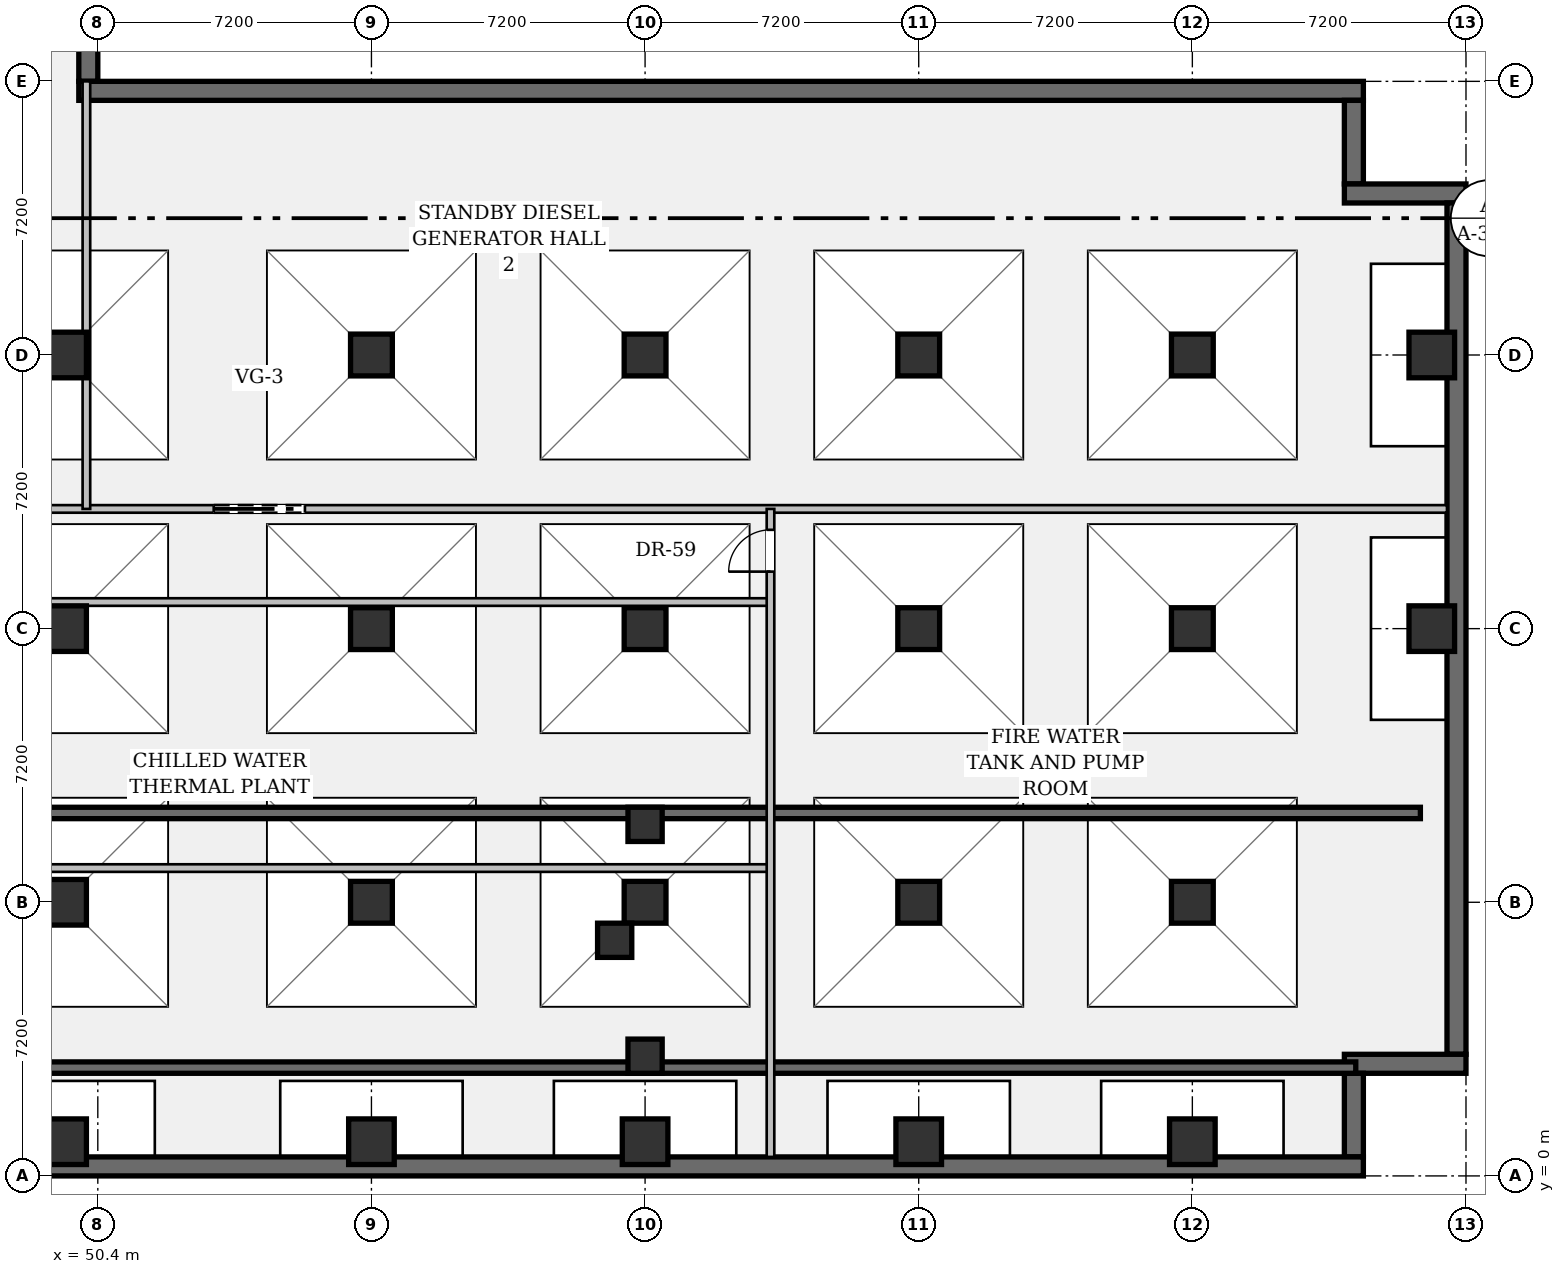
"""IFC4 building model, lengths in metres.
Left out: names, types, materials, properties, quantities, classifications, styles, units other than length and angle.
Written with IfcOpenShell. Run it as: python <this file> out.ifc"""

import sys

from ifc_helpers import new_model, si_unit, direction, frame, frame_2d, origin, origin_2d, place, context, subcontext, project, spatial, rectangle, hollow_rectangle, extrude, element, fill, save


model = new_model("IFC4")
c1 = context("Model", 3, precision=1e-05, world=origin(), true_north=direction((0.0, 1.0)))
c2 = subcontext(c1, "Body", "Model", "MODEL_VIEW")
j1 = project(units=[si_unit("LENGTHUNIT", "METRE"), si_unit("PLANEANGLEUNIT", "RADIAN")], contexts=[c1])
p1 = place(None, origin())
s1 = spatial("IfcSite", under=j1, at=p1, CompositionType="ELEMENT")
p2 = place(p1, origin())
s2 = spatial("IfcBuilding", under=s1, at=p2, CompositionType="ELEMENT")
p3 = place(p2, frame((0.0, 0.0, -9.1)))
s3 = spatial("IfcBuildingStorey", under=s2, at=p3, CompositionType="ELEMENT", Elevation=-9.1)
p4 = place(p3, frame((50.15, 47.2, 0.0), z_axis=(0.0, 0.0, 1.0), x_axis=(0.0, -1.0, 0.0)))
e1 = element("IfcWall", 1, at=p4, inside=s3, PredefinedType="SOLIDWALL", context=c2, shape_type="SweptSolid", body=[
    extrude(rectangle(XDim=18.4, YDim=0.5, at=frame_2d((9.2, 0.0))), origin(), (0.0, 0.0, 1.0), 4.25),
])
p5 = place(p3, frame((49.9, 28.55, 0.0), z_axis=(0.0, 0.0, 1.0), x_axis=(1.0, 0.0, 0.0)))
e2 = element("IfcWall", 2, at=p5, inside=s3, PredefinedType="SOLIDWALL", context=c2, shape_type="SweptSolid", body=[
    extrude(rectangle(XDim=33.8, YDim=0.5, at=frame_2d((16.9, 0.0))), origin(), (0.0, 0.0, 1.0), 4.25),
])
p6 = place(p3, frame((83.45, 28.3, 0.0), z_axis=(0.0, 0.0, 1.0), x_axis=(0.0, -1.0, 0.0)))
e3 = element("IfcWall", 3, at=p6, inside=s3, PredefinedType="SOLIDWALL", context=c2, shape_type="SweptSolid", body=[
    extrude(rectangle(XDim=2.2, YDim=0.5, at=frame_2d((1.1, 0.0))), origin(), (0.0, 0.0, 1.0), 4.25),
])
p7 = place(p3, frame((83.2, 25.85, 0.0), z_axis=(0.0, 0.0, 1.0), x_axis=(1.0, 0.0, 0.0)))
e4 = element("IfcWall", 4, at=p7, inside=s3, PredefinedType="SOLIDWALL", context=c2, shape_type="SweptSolid", body=[
    extrude(rectangle(XDim=3.2, YDim=0.5, at=frame_2d((1.6, 0.0))), origin(), (0.0, 0.0, 1.0), 4.25),
])
p8 = place(p3, frame((86.15, 25.6, 0.0), z_axis=(0.0, 0.0, 1.0), x_axis=(0.0, -1.0, 0.0)))
e5 = element("IfcWall", 5, at=p8, inside=s3, PredefinedType="SOLIDWALL", context=c2, shape_type="SweptSolid", body=[
    extrude(rectangle(XDim=22.4, YDim=0.5, at=frame_2d((11.2, 0.0))), origin(), (0.0, 0.0, 1.0), 4.25),
])
p9 = place(p3, frame((86.4, 2.95, 0.0), z_axis=(0.0, 0.0, 1.0), x_axis=(-1.0, 0.0, 0.0)))
e6 = element("IfcWall", 6, at=p9, inside=s3, PredefinedType="SOLIDWALL", context=c2, shape_type="SweptSolid", body=[
    extrude(rectangle(XDim=3.2, YDim=0.5, at=frame_2d((1.6, 0.0))), origin(), (0.0, 0.0, 1.0), 4.25),
])
p10 = place(p3, frame((83.45, 2.7, 0.0), z_axis=(0.0, 0.0, 1.0), x_axis=(0.0, -1.0, 0.0)))
e7 = element("IfcWall", 7, at=p10, inside=s3, PredefinedType="SOLIDWALL", context=c2, shape_type="SweptSolid", body=[
    extrude(rectangle(XDim=2.2, YDim=0.5, at=frame_2d((1.1, 0.0))), origin(), (0.0, 0.0, 1.0), 4.25),
])
p11 = place(p3, frame((83.7, 0.25, 0.0), z_axis=(0.0, 0.0, 1.0), x_axis=(-1.0, 0.0, 0.0)))
e8 = element("IfcWall", 8, at=p11, inside=s3, PredefinedType="SOLIDWALL", context=c2, shape_type="SweptSolid", body=[
    extrude(rectangle(XDim=81.0, YDim=0.5, at=frame_2d((40.5, 0.0))), origin(), (0.0, 0.0, 1.0), 4.25),
])
for number, where, z_axis, x_axis in (
    (9, (49.5, 0.9, 0.0), (0.0, 0.0, 1.0), (1.0, 0.0, 0.0)),
    (10, (49.5, 7.2, 0.0), (0.0, 0.0, 1.0), (1.0, 0.0, 0.0)),
    (11, (49.5, 14.4, 0.0), (0.0, 0.0, 1.0), (1.0, 0.0, 0.0)),
    (12, (49.5, 21.6, 0.0), (0.0, 0.0, 1.0), (1.0, 0.0, 0.0)),
    (13, (57.6, 0.9, 0.0), (0.0, 0.0, 1.0), (1.0, 0.0, 0.0)),
):
    element("IfcColumn", number, at=place(p3, frame(where, z_axis=z_axis, x_axis=x_axis)), inside=s3, PredefinedType="COLUMN", context=c2, shape_type="SweptSolid", body=[
        extrude(hollow_rectangle(XDim=1.2, YDim=1.2, WallThickness=0.075, at=origin_2d()), origin(), (0.0, 0.0, 1.0), 4.25),
    ])
for number, where, z_axis, x_axis in (
    (14, (57.6, 7.2, 0.0), (0.0, 0.0, 1.0), (1.0, 0.0, 0.0)),
    (15, (57.6, 14.4, 0.0), (0.0, 0.0, 1.0), (1.0, 0.0, 0.0)),
    (16, (57.6, 21.6, 0.0), (0.0, 0.0, 1.0), (1.0, 0.0, 0.0)),
):
    element("IfcColumn", number, at=place(p3, frame(where, z_axis=z_axis, x_axis=x_axis)), inside=s3, PredefinedType="COLUMN", context=c2, shape_type="SweptSolid", body=[
        extrude(rectangle(XDim=1.1, YDim=1.1, at=origin_2d()), origin(), (0.0, 0.0, 1.0), 4.25),
    ])
p12 = place(p3, frame((64.8, 0.9, 0.0), z_axis=(0.0, 0.0, 1.0), x_axis=(1.0, 0.0, 0.0)))
e17 = element("IfcColumn", 17, at=p12, inside=s3, PredefinedType="COLUMN", context=c2, shape_type="SweptSolid", body=[
    extrude(hollow_rectangle(XDim=1.2, YDim=1.2, WallThickness=0.075, at=origin_2d()), origin(), (0.0, 0.0, 1.0), 4.25),
])
for number, where, z_axis, x_axis in (
    (18, (64.8, 7.2, 0.0), (0.0, 0.0, 1.0), (1.0, 0.0, 0.0)),
    (19, (64.8, 14.4, 0.0), (0.0, 0.0, 1.0), (1.0, 0.0, 0.0)),
    (20, (64.8, 21.6, 0.0), (0.0, 0.0, 1.0), (1.0, 0.0, 0.0)),
):
    element("IfcColumn", number, at=place(p3, frame(where, z_axis=z_axis, x_axis=x_axis)), inside=s3, PredefinedType="COLUMN", context=c2, shape_type="SweptSolid", body=[
        extrude(rectangle(XDim=1.1, YDim=1.1, at=origin_2d()), origin(), (0.0, 0.0, 1.0), 4.25),
    ])
p13 = place(p3, frame((72.0, 0.9, 0.0), z_axis=(0.0, 0.0, 1.0), x_axis=(1.0, 0.0, 0.0)))
e21 = element("IfcColumn", 21, at=p13, inside=s3, PredefinedType="COLUMN", context=c2, shape_type="SweptSolid", body=[
    extrude(hollow_rectangle(XDim=1.2, YDim=1.2, WallThickness=0.075, at=origin_2d()), origin(), (0.0, 0.0, 1.0), 4.25),
])
for number, where, z_axis, x_axis in (
    (22, (72.0, 7.2, 0.0), (0.0, 0.0, 1.0), (1.0, 0.0, 0.0)),
    (23, (72.0, 14.4, 0.0), (0.0, 0.0, 1.0), (1.0, 0.0, 0.0)),
    (24, (72.0, 21.6, 0.0), (0.0, 0.0, 1.0), (1.0, 0.0, 0.0)),
):
    element("IfcColumn", number, at=place(p3, frame(where, z_axis=z_axis, x_axis=x_axis)), inside=s3, PredefinedType="COLUMN", context=c2, shape_type="SweptSolid", body=[
        extrude(rectangle(XDim=1.1, YDim=1.1, at=origin_2d()), origin(), (0.0, 0.0, 1.0), 4.25),
    ])
p14 = place(p3, frame((79.2, 0.9, 0.0), z_axis=(0.0, 0.0, 1.0), x_axis=(1.0, 0.0, 0.0)))
e25 = element("IfcColumn", 25, at=p14, inside=s3, PredefinedType="COLUMN", context=c2, shape_type="SweptSolid", body=[
    extrude(hollow_rectangle(XDim=1.2, YDim=1.2, WallThickness=0.075, at=origin_2d()), origin(), (0.0, 0.0, 1.0), 4.25),
])
for number, where, z_axis, x_axis in (
    (26, (79.2, 7.2, 0.0), (0.0, 0.0, 1.0), (1.0, 0.0, 0.0)),
    (27, (79.2, 14.4, 0.0), (0.0, 0.0, 1.0), (1.0, 0.0, 0.0)),
    (28, (79.2, 21.6, 0.0), (0.0, 0.0, 1.0), (1.0, 0.0, 0.0)),
):
    element("IfcColumn", number, at=place(p3, frame(where, z_axis=z_axis, x_axis=x_axis)), inside=s3, PredefinedType="COLUMN", context=c2, shape_type="SweptSolid", body=[
        extrude(rectangle(XDim=1.1, YDim=1.1, at=origin_2d()), origin(), (0.0, 0.0, 1.0), 4.25),
    ])
for number, where, z_axis, x_axis in (
    (29, (85.5, 14.4, 0.0), (0.0, 0.0, 1.0), (1.0, 0.0, 0.0)),
    (30, (85.5, 21.6, 0.0), (0.0, 0.0, 1.0), (1.0, 0.0, 0.0)),
):
    element("IfcColumn", number, at=place(p3, frame(where, z_axis=z_axis, x_axis=x_axis)), inside=s3, PredefinedType="COLUMN", context=c2, shape_type="SweptSolid", body=[
        extrude(hollow_rectangle(XDim=1.2, YDim=1.2, WallThickness=0.075, at=origin_2d()), origin(), (0.0, 0.0, 1.0), 4.25),
    ])
p15 = place(p3, frame((38.65, 2.85, 0.0), z_axis=(0.0, 0.0, 1.0), x_axis=(1.0, 0.0, 0.0)))
e31 = element("IfcWall", 31, at=p15, inside=s3, PredefinedType="SHEAR", context=c2, shape_type="SweptSolid", body=[
    extrude(rectangle(XDim=44.85, YDim=0.3, at=frame_2d((22.425, 0.0))), origin(), (0.0, 0.0, 1.0), 4.25),
])
p16 = place(p3, frame((38.65, 9.55, 0.0), z_axis=(0.0, 0.0, 1.0), x_axis=(1.0, 0.0, 0.0)))
e32 = element("IfcWall", 32, at=p16, inside=s3, PredefinedType="SHEAR", context=c2, shape_type="SweptSolid", body=[
    extrude(rectangle(XDim=46.55, YDim=0.3, at=frame_2d((23.275, 0.0))), origin(), (0.0, 0.0, 1.0), 4.25),
])
for number, where, z_axis, x_axis in (
    (33, (64.8, 3.15, 0.0), (0.0, 0.0, 1.0), (1.0, 0.0, 0.0)),
    (34, (64.0, 6.2, 0.0), (0.0, 0.0, 1.0), (1.0, 0.0, 0.0)),
    (35, (64.8, 9.25, 0.0), (0.0, 0.0, 1.0), (1.0, 0.0, 0.0)),
):
    element("IfcColumn", number, at=place(p3, frame(where, z_axis=z_axis, x_axis=x_axis)), inside=s3, PredefinedType="COLUMN", context=c2, shape_type="SweptSolid", body=[
        extrude(rectangle(XDim=0.9, YDim=0.9, at=origin_2d()), origin(), (0.0, 0.0, 1.0), 4.25),
    ])
p17 = place(p3, frame((14.4, 8.1, 0.0), z_axis=(0.0, 0.0, 1.0), x_axis=(1.0, 0.0, 0.0)))
e36 = element("IfcWall", 36, at=p17, inside=s3, PredefinedType="PARTITIONING", context=c2, shape_type="SweptSolid", body=[
    extrude(rectangle(XDim=53.7, YDim=0.2, at=frame_2d((26.85, 0.0))), origin(), (0.0, 0.0, 1.0), 3.288),
])
p18 = place(p17, frame((1.1, 0.0, 0.0)))
e37 = element("IfcOpeningElement", 37, at=p18, cuts=e36, PredefinedType="OPENING", context=c2, shape_type="SweptSolid", body=[
    extrude(rectangle(XDim=1.1, YDim=2.15, at=frame_2d((0.55, 1.075))), frame((0.0, 0.112, 0.0), z_axis=(0.0, -1.0, 0.0), x_axis=(1.0, 0.0, 0.0)), (0.0, 0.0, 1.0), 0.224),
])
p19 = place(p3, frame((17.45, 15.1, 0.0), z_axis=(0.0, 0.0, 1.0), x_axis=(1.0, 0.0, 0.0)))
e38 = element("IfcWall", 38, at=p19, inside=s3, PredefinedType="PARTITIONING", context=c2, shape_type="SweptSolid", body=[
    extrude(rectangle(XDim=50.65, YDim=0.2, at=frame_2d((25.325, 0.0))), origin(), (0.0, 0.0, 1.0), 3.288),
])
p20 = place(p19, frame((5.2, 0.0, 0.0)))
e39 = element("IfcOpeningElement", 39, at=p20, cuts=e38, PredefinedType="OPENING", context=c2, shape_type="SweptSolid", body=[
    extrude(rectangle(XDim=2.4, YDim=2.4, at=frame_2d((1.2, 1.2))), frame((0.0, 0.112, 0.0), z_axis=(0.0, -1.0, 0.0), x_axis=(1.0, 0.0, 0.0)), (0.0, 0.0, 1.0), 0.224),
])
p21 = place(p19, frame((22.0, 0.0, 0.0)))
e40 = element("IfcOpeningElement", 40, at=p21, cuts=e38, PredefinedType="OPENING", context=c2, shape_type="SweptSolid", body=[
    extrude(rectangle(XDim=1.6, YDim=2.2, at=frame_2d((0.8, 1.1))), frame((0.0, 0.112, 0.0), z_axis=(0.0, -1.0, 0.0), x_axis=(1.0, 0.0, 0.0)), (0.0, 0.0, 1.0), 0.224),
])
p22 = place(p3, frame((17.45, 17.55, 0.0), z_axis=(0.0, 0.0, 1.0), x_axis=(1.0, 0.0, 0.0)))
e41 = element("IfcWall", 41, at=p22, inside=s3, PredefinedType="PARTITIONING", context=c2, shape_type="SweptSolid", body=[
    extrude(rectangle(XDim=68.45, YDim=0.2, at=frame_2d((34.225, 0.0))), origin(), (0.0, 0.0, 1.0), 3.288),
])
p23 = place(p22, frame((4.5, 0.0, 0.0)))
e42 = element("IfcOpeningElement", 42, at=p23, cuts=e41, PredefinedType="OPENING", context=c2, shape_type="SweptSolid", body=[
    extrude(rectangle(XDim=2.4, YDim=2.4, at=frame_2d((1.2, 1.2))), frame((0.0, 0.112, 0.0), z_axis=(0.0, -1.0, 0.0), x_axis=(1.0, 0.0, 0.0)), (0.0, 0.0, 1.0), 0.224),
])
p24 = place(p22, frame((36.0, 0.0, 0.0)))
e43 = element("IfcOpeningElement", 43, at=p24, cuts=e41, PredefinedType="OPENING", context=c2, shape_type="SweptSolid", body=[
    extrude(rectangle(XDim=2.4, YDim=2.4, at=frame_2d((1.2, 1.2))), frame((0.0, 0.112, 0.0), z_axis=(0.0, -1.0, 0.0), x_axis=(1.0, 0.0, 0.0)), (0.0, 0.0, 1.0), 0.224),
])
p25 = place(p3, frame((68.1, 0.5, 0.0), z_axis=(0.0, 0.0, 1.0), x_axis=(0.0, 1.0, 0.0)))
e44 = element("IfcWall", 44, at=p25, inside=s3, PredefinedType="PARTITIONING", context=c2, shape_type="SweptSolid", body=[
    extrude(rectangle(XDim=17.05, YDim=0.2, at=frame_2d((8.525, 0.0))), origin(), (0.0, 0.0, 1.0), 3.288),
])
p26 = place(p25, frame((15.4, 0.0, 0.0)))
e45 = element("IfcOpeningElement", 45, at=p26, cuts=e44, PredefinedType="OPENING", context=c2, shape_type="SweptSolid", body=[
    extrude(rectangle(XDim=1.1, YDim=2.15, at=frame_2d((0.55, 1.075))), frame((0.0, 0.112, 0.0), z_axis=(0.0, -1.0, 0.0), x_axis=(1.0, 0.0, 0.0)), (0.0, 0.0, 1.0), 0.224),
])
p27 = place(p3, frame((50.1, 17.55, 0.0), z_axis=(0.0, 0.0, 1.0), x_axis=(0.0, 1.0, 0.0)))
e46 = element("IfcWall", 46, at=p27, inside=s3, PredefinedType="PARTITIONING", context=c2, shape_type="SweptSolid", body=[
    extrude(rectangle(XDim=11.25, YDim=0.2, at=frame_2d((5.625, 0.0))), origin(), (0.0, 0.0, 1.0), 3.288),
])
p28 = place(p24, origin())
e47 = element("IfcDoor", 47, at=p28, inside=s3, OperationType="DOUBLE_DOOR_SINGLE_SWING", PredefinedType="GATE", context=c2, shape_type="SweptSolid", body=[
    extrude(rectangle(XDim=2.4, YDim=2.4, at=frame_2d((1.2, 1.2))), frame((0.0, 0.025, 0.0), z_axis=(0.0, -1.0, 0.0), x_axis=(1.0, 0.0, 0.0)), (0.0, 0.0, 1.0), 0.05),
])
fill(e43, e47)
p29 = place(p26, origin())
e48 = element("IfcDoor", 48, at=p29, inside=s3, OperationType="SINGLE_SWING_LEFT", PredefinedType="DOOR", context=c2, shape_type="SweptSolid", body=[
    extrude(rectangle(XDim=1.1, YDim=2.15, at=frame_2d((0.55, 1.075))), frame((0.0, 0.025, 0.0), z_axis=(0.0, -1.0, 0.0), x_axis=(1.0, 0.0, 0.0)), (0.0, 0.0, 1.0), 0.05),
])
fill(e45, e48)
save(model, sys.argv[1])
